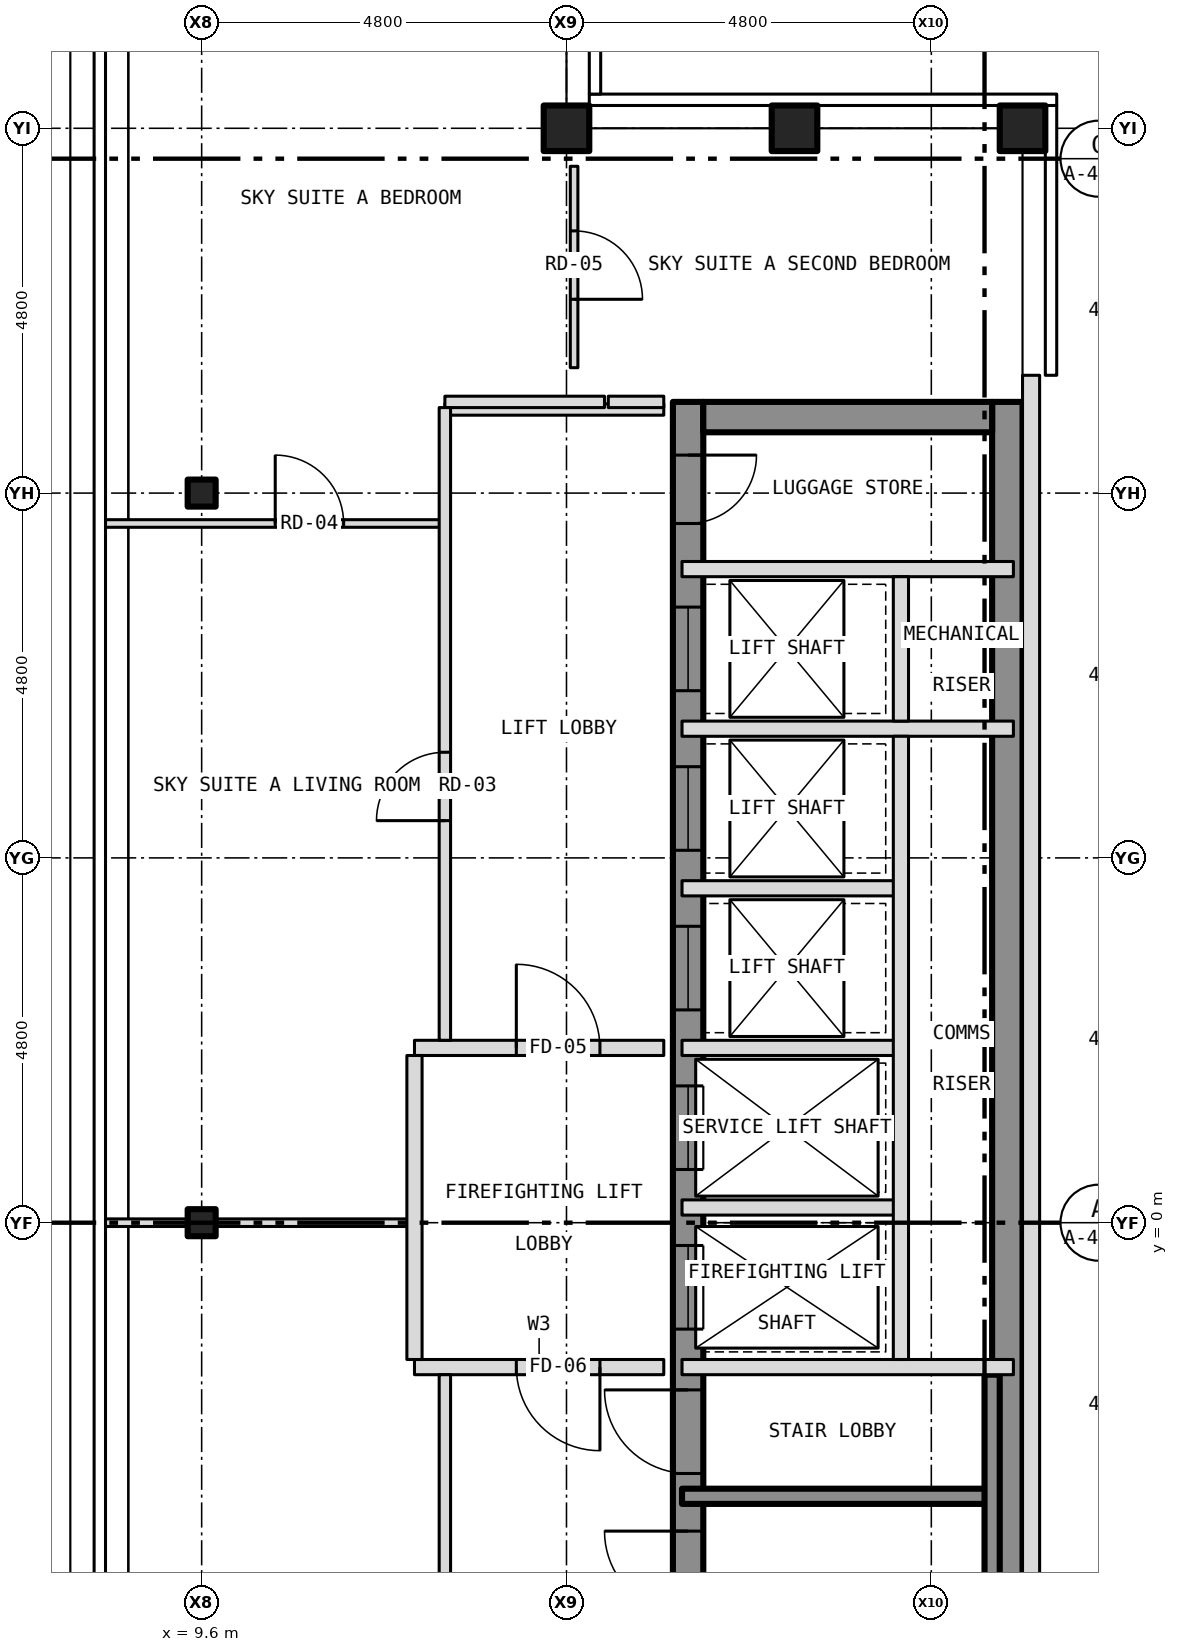
"""IFC4 building model, lengths in metres.
Left out: names, types, materials, properties, quantities, classifications, styles, units other than length and angle.
Written with IfcOpenShell. Run it as: python <this file> out.ifc"""

import sys

from ifc_helpers import new_model, si_unit, direction, frame, frame_2d, origin, origin_2d, place, context, subcontext, project, spatial, rectangle, hollow_rectangle, i_section, extrude, element, fill, save


model = new_model("IFC4")
c1 = context("Model", 3, precision=1e-05, world=origin(), true_north=direction((0.0, 1.0)))
c2 = subcontext(c1, "Body", "Model", "MODEL_VIEW")
j1 = project(units=[si_unit("LENGTHUNIT", "METRE"), si_unit("PLANEANGLEUNIT", "RADIAN")], contexts=[c1])
p1 = place(None, origin())
s1 = spatial("IfcSite", under=j1, at=p1, CompositionType="ELEMENT")
p2 = place(p1, origin())
s2 = spatial("IfcBuilding", under=s1, at=p2, CompositionType="ELEMENT")
p3 = place(p2, frame((0.0, 0.0, 272.5)))
s3 = spatial("IfcBuildingStorey", under=s2, at=p3, CompositionType="ELEMENT", Elevation=272.5)
for number, where, z_axis, x_axis in (
    (1, (20.4, 14.4, -0.15), (0.0, 0.0, 1.0), (1.0, 0.0, 0.0)),
    (2, (14.4, 14.4, -0.15), (0.0, 0.0, 1.0), (1.0, 0.0, 0.0)),
    (3, (17.4, 14.4, -0.15), (0.0, 0.0, 1.0), (1.0, 0.0, 0.0)),
):
    element("IfcColumn", number, at=place(p3, frame(where, z_axis=z_axis, x_axis=x_axis)), inside=s3, PredefinedType="COLUMN", context=c2, shape_type="SweptSolid", body=[
        extrude(hollow_rectangle(XDim=0.6, YDim=0.6, WallThickness=0.03, at=origin_2d()), origin(), (0.0, 0.0, 1.0), 3.5),
    ])
for number, where, z_axis, x_axis in (
    (4, (9.6, 0.0, -0.15), (0.0, 0.0, 1.0), (1.0, 0.0, 0.0)),
    (5, (9.6, 9.6, -0.15), (0.0, 0.0, 1.0), (1.0, 0.0, 0.0)),
):
    element("IfcColumn", number, at=place(p3, frame(where, z_axis=z_axis, x_axis=x_axis)), inside=s3, PredefinedType="COLUMN", context=c2, shape_type="SweptSolid", body=[
        extrude(i_section(OverallWidth=0.368, OverallDepth=0.356, WebThickness=0.011, FlangeThickness=0.018, at=origin_2d()), origin(), (0.0, 0.0, 1.0), 3.5),
    ])
p4 = place(p3, frame((16.0, -10.8, 0.0), z_axis=(0.0, 0.0, 1.0), x_axis=(0.0, 1.0, 0.0)))
e6 = element("IfcWall", 6, at=p4, inside=s3, PredefinedType="SHEAR", context=c2, shape_type="SweptSolid", body=[
    extrude(rectangle(XDim=21.6, YDim=0.4, at=frame_2d((10.8, 0.0))), origin(), (0.0, 0.0, 1.0), 3.25),
])
p5 = place(p4, frame((9.4, 0.0, 0.0)))
e7 = element("IfcOpeningElement", 7, at=p5, cuts=e6, PredefinedType="OPENING", context=c2, shape_type="SweptSolid", body=[
    extrude(rectangle(XDim=1.1, YDim=2.1, at=frame_2d((0.55, 1.05))), frame((0.0, 0.212, 0.0), z_axis=(0.0, -1.0, 0.0), x_axis=(1.0, 0.0, 0.0)), (0.0, 0.0, 1.0), 0.424),
])
p6 = place(p4, frame((11.5, 0.0, 0.0)))
e8 = element("IfcOpeningElement", 8, at=p6, cuts=e6, PredefinedType="OPENING", context=c2, shape_type="SweptSolid", body=[
    extrude(rectangle(XDim=1.1, YDim=2.1, at=frame_2d((0.55, 1.05))), frame((0.0, 0.212, 0.0), z_axis=(0.0, -1.0, 0.0), x_axis=(1.0, 0.0, 0.0)), (0.0, 0.0, 1.0), 0.424),
])
p7 = place(p4, frame((13.6, 0.0, 0.0)))
e9 = element("IfcOpeningElement", 9, at=p7, cuts=e6, PredefinedType="OPENING", context=c2, shape_type="SweptSolid", body=[
    extrude(rectangle(XDim=1.1, YDim=2.1, at=frame_2d((0.55, 1.05))), frame((0.0, 0.212, 0.0), z_axis=(0.0, -1.0, 0.0), x_axis=(1.0, 0.0, 0.0)), (0.0, 0.0, 1.0), 0.424),
])
p8 = place(p4, frame((15.7, 0.0, 0.0)))
e10 = element("IfcOpeningElement", 10, at=p8, cuts=e6, PredefinedType="OPENING", context=c2, shape_type="SweptSolid", body=[
    extrude(rectangle(XDim=1.1, YDim=2.1, at=frame_2d((0.55, 1.05))), frame((0.0, 0.212, 0.0), z_axis=(0.0, -1.0, 0.0), x_axis=(1.0, 0.0, 0.0)), (0.0, 0.0, 1.0), 0.424),
])
p9 = place(p4, frame((17.8, 0.0, 0.0)))
e11 = element("IfcOpeningElement", 11, at=p9, cuts=e6, PredefinedType="OPENING", context=c2, shape_type="SweptSolid", body=[
    extrude(rectangle(XDim=1.1, YDim=2.1, at=frame_2d((0.55, 1.05))), frame((0.0, 0.212, 0.0), z_axis=(0.0, -1.0, 0.0), x_axis=(1.0, 0.0, 0.0)), (0.0, 0.0, 1.0), 0.424),
])
p10 = place(p4, frame((5.642, 0.0, 0.0)))
e12 = element("IfcOpeningElement", 12, at=p10, cuts=e6, PredefinedType="OPENING", context=c2, shape_type="SweptSolid", body=[
    extrude(rectangle(XDim=1.1, YDim=2.1, at=frame_2d((0.55, 1.05))), frame((0.0, 0.212, 0.0), z_axis=(0.0, -1.0, 0.0), x_axis=(1.0, 0.0, 0.0)), (0.0, 0.0, 1.0), 0.424),
])
p11 = place(p4, frame((7.5, 0.0, 0.0)))
e13 = element("IfcOpeningElement", 13, at=p11, cuts=e6, PredefinedType="OPENING", context=c2, shape_type="SweptSolid", body=[
    extrude(rectangle(XDim=1.1, YDim=2.1, at=frame_2d((0.55, 1.05))), frame((0.0, 0.212, 0.0), z_axis=(0.0, -1.0, 0.0), x_axis=(1.0, 0.0, 0.0)), (0.0, 0.0, 1.0), 0.424),
])
p12 = place(p4, frame((20.0, 0.0, 0.0)))
e14 = element("IfcOpeningElement", 14, at=p12, cuts=e6, PredefinedType="OPENING", context=c2, shape_type="SweptSolid", body=[
    extrude(rectangle(XDim=0.9, YDim=2.1, at=frame_2d((0.45, 1.05))), frame((0.0, 0.212, 0.0), z_axis=(0.0, -1.0, 0.0), x_axis=(1.0, 0.0, 0.0)), (0.0, 0.0, 1.0), 0.424),
])
p13 = place(p3, frame((20.2, -10.8, 0.0), z_axis=(0.0, 0.0, 1.0), x_axis=(0.0, 1.0, 0.0)))
e15 = element("IfcWall", 15, at=p13, inside=s3, PredefinedType="SHEAR", context=c2, shape_type="SweptSolid", body=[
    extrude(rectangle(XDim=21.6, YDim=0.4, at=frame_2d((10.8, 0.0))), origin(), (0.0, 0.0, 1.0), 3.25),
])
p14 = place(p3, frame((16.2, 10.6, 0.0), z_axis=(0.0, 0.0, 1.0), x_axis=(1.0, 0.0, 0.0)))
e16 = element("IfcWall", 16, at=p14, inside=s3, PredefinedType="SHEAR", context=c2, shape_type="SweptSolid", body=[
    extrude(rectangle(XDim=3.8, YDim=0.4, at=frame_2d((1.9, 0.0))), origin(), (0.0, 0.0, 1.0), 3.25),
])
p15 = place(p3, frame((20.512, -11.15, 0.0), z_axis=(0.0, 0.0, 1.0), x_axis=(0.0, 1.0, 0.0)))
e17 = element("IfcWall", 17, at=p15, inside=s3, PredefinedType="SOLIDWALL", context=c2, shape_type="SweptSolid", body=[
    extrude(rectangle(XDim=22.3, YDim=0.225, at=frame_2d((11.15, 0.0))), origin(), (0.0, 0.0, 1.0), 3.5),
])
p16 = place(p15, frame((3.3, 0.0, 1.0)))
e18 = element("IfcOpeningElement", 18, at=p16, cuts=e17, PredefinedType="OPENING", context=c2, shape_type="SweptSolid", body=[
    extrude(rectangle(XDim=0.6, YDim=1.5, at=frame_2d((0.3, 0.75))), frame((0.0, 0.125, 0.0), z_axis=(0.0, -1.0, 0.0), x_axis=(1.0, 0.0, 0.0)), (0.0, 0.0, 1.0), 0.249),
])
p17 = place(p3, frame((15.92, -3.6, 0.0), z_axis=(0.0, 0.0, 1.0), x_axis=(1.0, 0.0, 0.0)))
e19 = element("IfcWall", 19, at=p17, inside=s3, PredefinedType="SHEAR", context=c2, shape_type="SweptSolid", body=[
    extrude(rectangle(XDim=4.08, YDim=0.2, at=frame_2d((2.04, 0.0))), origin(), (0.0, 0.0, 1.0), 3.25),
])
p18 = place(p3, frame((12.4, -1.9, 0.0), z_axis=(0.0, 0.0, 1.0), x_axis=(1.0, 0.0, 0.0)))
e20 = element("IfcWall", 20, at=p18, inside=s3, PredefinedType="PARTITIONING", context=c2, shape_type="SweptSolid", body=[
    extrude(rectangle(XDim=3.28, YDim=0.2, at=frame_2d((1.64, 0.0))), origin(), (0.0, 0.0, 1.0), 3.35),
])
p19 = place(p18, frame((1.34, 0.0, 0.0)))
e21 = element("IfcOpeningElement", 21, at=p19, cuts=e20, PredefinedType="OPENING", context=c2, shape_type="SweptSolid", body=[
    extrude(rectangle(XDim=1.1, YDim=2.1, at=frame_2d((0.55, 1.05))), frame((0.0, 0.112, 0.0), z_axis=(0.0, -1.0, 0.0), x_axis=(1.0, 0.0, 0.0)), (0.0, 0.0, 1.0), 0.224),
])
p20 = place(p3, frame((15.92, -1.9, 0.0), z_axis=(0.0, 0.0, 1.0), x_axis=(1.0, 0.0, 0.0)))
e22 = element("IfcWall", 22, at=p20, inside=s3, PredefinedType="PARTITIONING", context=c2, shape_type="SweptSolid", body=[
    extrude(rectangle(XDim=4.36, YDim=0.2, at=frame_2d((2.18, 0.0))), origin(), (0.0, 0.0, 1.0), 3.25),
])
p21 = place(p3, frame((8.305, 0.0, 0.0), z_axis=(0.0, 0.0, 1.0), x_axis=(1.0, 0.0, 0.0)))
e23 = element("IfcWall", 23, at=p21, inside=s3, PredefinedType="PARTITIONING", context=c2, shape_type="SweptSolid", body=[
    extrude(rectangle(XDim=1.479, YDim=0.1, at=frame_2d((0.74, 0.0))), origin(), (0.0, 0.0, 1.0), 3.35),
])
p22 = place(p3, frame((9.784, 0.0, 0.0), z_axis=(0.0, 0.0, 1.0), x_axis=(1.0, 0.0, 0.0)))
e24 = element("IfcWall", 24, at=p22, inside=s3, PredefinedType="PARTITIONING", context=c2, shape_type="SweptSolid", body=[
    extrude(rectangle(XDim=2.616, YDim=0.1, at=frame_2d((1.308, 0.0))), origin(), (0.0, 0.0, 1.0), 2.728),
])
p23 = place(p3, frame((15.92, 0.2, 0.0), z_axis=(0.0, 0.0, 1.0), x_axis=(1.0, 0.0, 0.0)))
e25 = element("IfcWall", 25, at=p23, inside=s3, PredefinedType="PARTITIONING", context=c2, shape_type="SweptSolid", body=[
    extrude(rectangle(XDim=2.88, YDim=0.2, at=frame_2d((1.44, 0.0))), origin(), (0.0, 0.0, 1.0), 3.25),
])
p24 = place(p3, frame((12.4, 2.3, 0.0), z_axis=(0.0, 0.0, 1.0), x_axis=(1.0, 0.0, 0.0)))
e26 = element("IfcWall", 26, at=p24, inside=s3, PredefinedType="PARTITIONING", context=c2, shape_type="SweptSolid", body=[
    extrude(rectangle(XDim=3.28, YDim=0.2, at=frame_2d((1.64, 0.0))), origin(), (0.0, 0.0, 1.0), 3.35),
])
p25 = place(p24, frame((1.34, 0.0, 0.0)))
e27 = element("IfcOpeningElement", 27, at=p25, cuts=e26, PredefinedType="OPENING", context=c2, shape_type="SweptSolid", body=[
    extrude(rectangle(XDim=1.1, YDim=2.1, at=frame_2d((0.55, 1.05))), frame((0.0, 0.112, 0.0), z_axis=(0.0, -1.0, 0.0), x_axis=(1.0, 0.0, 0.0)), (0.0, 0.0, 1.0), 0.224),
])
for number, where, z_axis, x_axis in (
    (28, (15.92, 2.3, 0.0), (0.0, 0.0, 1.0), (1.0, 0.0, 0.0)),
    (29, (15.92, 4.4, 0.0), (0.0, 0.0, 1.0), (1.0, 0.0, 0.0)),
):
    element("IfcWall", number, at=place(p3, frame(where, z_axis=z_axis, x_axis=x_axis)), inside=s3, PredefinedType="PARTITIONING", context=c2, shape_type="SweptSolid", body=[
        extrude(rectangle(XDim=2.88, YDim=0.2, at=frame_2d((1.44, 0.0))), origin(), (0.0, 0.0, 1.0), 3.25),
    ])
for number, where, z_axis, x_axis in (
    (30, (15.92, 6.5, 0.0), (0.0, 0.0, 1.0), (1.0, 0.0, 0.0)),
    (31, (15.92, 8.6, 0.0), (0.0, 0.0, 1.0), (1.0, 0.0, 0.0)),
):
    element("IfcWall", number, at=place(p3, frame(where, z_axis=z_axis, x_axis=x_axis)), inside=s3, PredefinedType="PARTITIONING", context=c2, shape_type="SweptSolid", body=[
        extrude(rectangle(XDim=4.36, YDim=0.2, at=frame_2d((2.18, 0.0))), origin(), (0.0, 0.0, 1.0), 3.25),
    ])
p26 = place(p3, frame((8.305, 9.2, 0.0), z_axis=(0.0, 0.0, 1.0), x_axis=(1.0, 0.0, 0.0)))
e32 = element("IfcWall", 32, at=p26, inside=s3, PredefinedType="PARTITIONING", context=c2, shape_type="SweptSolid", body=[
    extrude(rectangle(XDim=4.495, YDim=0.1, at=frame_2d((2.248, 0.0))), origin(), (0.0, 0.0, 1.0), 3.35),
])
p27 = place(p26, frame((2.263, 0.0, 0.0)))
e33 = element("IfcOpeningElement", 33, at=p27, cuts=e32, PredefinedType="OPENING", context=c2, shape_type="SweptSolid", body=[
    extrude(rectangle(XDim=0.9, YDim=2.1, at=frame_2d((0.45, 1.05))), frame((0.0, 0.062, 0.0), z_axis=(0.0, -1.0, 0.0), x_axis=(1.0, 0.0, 0.0)), (0.0, 0.0, 1.0), 0.124),
])
p28 = place(p3, frame((12.8, 10.7, 0.0), z_axis=(0.0, 0.0, 1.0), x_axis=(1.0, 0.0, 0.0)))
e34 = element("IfcWall", 34, at=p28, inside=s3, PredefinedType="PARTITIONING", context=c2, shape_type="SweptSolid", body=[
    extrude(rectangle(XDim=2.88, YDim=0.15, at=frame_2d((1.44, 0.0))), origin(), (0.0, 0.0, 1.0), 3.35),
])
p29 = place(p3, frame((12.8, 10.8, 0.0), z_axis=(0.0, 0.0, 1.0), x_axis=(1.0, 0.0, 0.0)))
e35 = element("IfcWall", 35, at=p29, inside=s3, PredefinedType="PARTITIONING", context=c2, shape_type="SweptSolid", body=[
    extrude(rectangle(XDim=2.1, YDim=0.15, at=frame_2d((1.05, 0.0))), origin(), (0.0, 0.0, 1.0), 3.35),
])
p30 = place(p3, frame((14.95, 10.8, 0.0), z_axis=(0.0, 0.0, 1.0), x_axis=(1.0, 0.0, 0.0)))
e36 = element("IfcWall", 36, at=p30, inside=s3, PredefinedType="PARTITIONING", context=c2, shape_type="SweptSolid", body=[
    extrude(rectangle(XDim=0.73, YDim=0.15, at=frame_2d((0.365, 0.0))), origin(), (0.0, 0.0, 1.0), 3.35),
])
p31 = place(p3, frame((12.4, -1.8, 0.0), z_axis=(0.0, 0.0, 1.0), x_axis=(0.0, 1.0, 0.0)))
e37 = element("IfcWall", 37, at=p31, inside=s3, PredefinedType="PARTITIONING", context=c2, shape_type="SweptSolid", body=[
    extrude(rectangle(XDim=4.0, YDim=0.2, at=frame_2d((2.0, 0.0))), origin(), (0.0, 0.0, 1.0), 3.35),
])
p32 = place(p3, frame((12.8, -10.725, 0.0), z_axis=(0.0, 0.0, 1.0), x_axis=(0.0, 1.0, 0.0)))
e38 = element("IfcWall", 38, at=p32, inside=s3, PredefinedType="PARTITIONING", context=c2, shape_type="SweptSolid", body=[
    extrude(rectangle(XDim=8.725, YDim=0.15, at=frame_2d((4.363, 0.0))), origin(), (0.0, 0.0, 1.0), 3.35),
])
p33 = place(p32, frame((4.225, 0.0, 0.0)))
e39 = element("IfcOpeningElement", 39, at=p33, cuts=e38, PredefinedType="OPENING", context=c2, shape_type="SweptSolid", body=[
    extrude(rectangle(XDim=0.9, YDim=2.1, at=frame_2d((0.45, 1.05))), frame((0.0, 0.087, 0.0), z_axis=(0.0, -1.0, 0.0), x_axis=(1.0, 0.0, 0.0)), (0.0, 0.0, 1.0), 0.174),
])
p34 = place(p3, frame((12.8, 2.4, 0.0), z_axis=(0.0, 0.0, 1.0), x_axis=(0.0, 1.0, 0.0)))
e40 = element("IfcWall", 40, at=p34, inside=s3, PredefinedType="PARTITIONING", context=c2, shape_type="SweptSolid", body=[
    extrude(rectangle(XDim=8.325, YDim=0.15, at=frame_2d((4.163, 0.0))), origin(), (0.0, 0.0, 1.0), 3.35),
])
p35 = place(p34, frame((2.89, 0.0, 0.0)))
e41 = element("IfcOpeningElement", 41, at=p35, cuts=e40, PredefinedType="OPENING", context=c2, shape_type="SweptSolid", body=[
    extrude(rectangle(XDim=0.9, YDim=2.1, at=frame_2d((0.45, 1.05))), frame((0.0, 0.087, 0.0), z_axis=(0.0, -1.0, 0.0), x_axis=(1.0, 0.0, 0.0)), (0.0, 0.0, 1.0), 0.174),
])
p36 = place(p3, frame((14.5, 11.25, 0.0), z_axis=(0.0, 0.0, 1.0), x_axis=(0.0, 1.0, 0.0)))
e42 = element("IfcWall", 42, at=p36, inside=s3, PredefinedType="PARTITIONING", context=c2, shape_type="SweptSolid", body=[
    extrude(rectangle(XDim=2.65, YDim=0.1, at=frame_2d((1.325, 0.0))), origin(), (0.0, 0.0, 1.0), 2.817),
])
p37 = place(p36, frame((0.9, 0.0, 0.0)))
e43 = element("IfcOpeningElement", 43, at=p37, cuts=e42, PredefinedType="OPENING", context=c2, shape_type="SweptSolid", body=[
    extrude(rectangle(XDim=0.9, YDim=2.1, at=frame_2d((0.45, 1.05))), frame((0.0, 0.062, 0.0), z_axis=(0.0, -1.0, 0.0), x_axis=(1.0, 0.0, 0.0)), (0.0, 0.0, 1.0), 0.124),
])
p38 = place(p3, frame((18.8, -1.8, 0.0), z_axis=(0.0, 0.0, 1.0), x_axis=(0.0, 1.0, 0.0)))
e44 = element("IfcWall", 44, at=p38, inside=s3, PredefinedType="PARTITIONING", context=c2, shape_type="SweptSolid", body=[
    extrude(rectangle(XDim=8.2, YDim=0.2, at=frame_2d((4.1, 0.0))), origin(), (0.0, 0.0, 1.0), 3.25),
])
p39 = place(p3, frame((18.8, 6.6, 0.0), z_axis=(0.0, 0.0, 1.0), x_axis=(0.0, 1.0, 0.0)))
e45 = element("IfcWall", 45, at=p39, inside=s3, PredefinedType="PARTITIONING", context=c2, shape_type="SweptSolid", body=[
    extrude(rectangle(XDim=1.9, YDim=0.2, at=frame_2d((0.95, 0.0))), origin(), (0.0, 0.0, 1.0), 3.25),
])
p40 = place(p3, frame((20.0, -10.68, 0.0), z_axis=(0.0, 0.0, 1.0), x_axis=(0.0, 1.0, 0.0)))
e46 = element("IfcWall", 46, at=p40, inside=s3, PredefinedType="SHEAR", context=c2, shape_type="SweptSolid", body=[
    extrude(rectangle(XDim=8.68, YDim=0.2, at=frame_2d((4.34, 0.0))), origin(), (0.0, 0.0, 1.0), 3.25),
])
p41 = place(p5, origin())
e47 = element("IfcDoor", 47, at=p41, inside=s3, OperationType="SLIDING_TO_LEFT", PredefinedType="DOOR", context=c2, shape_type="SweptSolid", body=[
    extrude(rectangle(XDim=1.1, YDim=2.1, at=frame_2d((0.55, 1.05))), frame((0.0, 0.025, 0.0), z_axis=(0.0, -1.0, 0.0), x_axis=(1.0, 0.0, 0.0)), (0.0, 0.0, 1.0), 0.05),
])
fill(e7, e47)
p42 = place(p6, origin())
e48 = element("IfcDoor", 48, at=p42, inside=s3, OperationType="SLIDING_TO_LEFT", PredefinedType="DOOR", context=c2, shape_type="SweptSolid", body=[
    extrude(rectangle(XDim=1.1, YDim=2.1, at=frame_2d((0.55, 1.05))), frame((0.0, 0.025, 0.0), z_axis=(0.0, -1.0, 0.0), x_axis=(1.0, 0.0, 0.0)), (0.0, 0.0, 1.0), 0.05),
])
fill(e8, e48)
p43 = place(p7, origin())
e49 = element("IfcDoor", 49, at=p43, inside=s3, OperationType="SLIDING_TO_LEFT", PredefinedType="DOOR", context=c2, shape_type="SweptSolid", body=[
    extrude(rectangle(XDim=1.1, YDim=2.1, at=frame_2d((0.55, 1.05))), frame((0.0, 0.025, 0.0), z_axis=(0.0, -1.0, 0.0), x_axis=(1.0, 0.0, 0.0)), (0.0, 0.0, 1.0), 0.05),
])
fill(e9, e49)
p44 = place(p8, origin())
e50 = element("IfcDoor", 50, at=p44, inside=s3, OperationType="SLIDING_TO_LEFT", PredefinedType="DOOR", context=c2, shape_type="SweptSolid", body=[
    extrude(rectangle(XDim=1.1, YDim=2.1, at=frame_2d((0.55, 1.05))), frame((0.0, 0.025, 0.0), z_axis=(0.0, -1.0, 0.0), x_axis=(1.0, 0.0, 0.0)), (0.0, 0.0, 1.0), 0.05),
])
fill(e10, e50)
p45 = place(p9, origin())
e51 = element("IfcDoor", 51, at=p45, inside=s3, OperationType="SLIDING_TO_LEFT", PredefinedType="DOOR", context=c2, shape_type="SweptSolid", body=[
    extrude(rectangle(XDim=1.1, YDim=2.1, at=frame_2d((0.55, 1.05))), frame((0.0, 0.025, 0.0), z_axis=(0.0, -1.0, 0.0), x_axis=(1.0, 0.0, 0.0)), (0.0, 0.0, 1.0), 0.05),
])
fill(e11, e51)
p46 = place(p10, origin())
e52 = element("IfcDoor", 52, at=p46, inside=s3, OperationType="SINGLE_SWING_RIGHT", PredefinedType="DOOR", context=c2, shape_type="SweptSolid", body=[
    extrude(rectangle(XDim=1.1, YDim=2.1, at=frame_2d((0.55, 1.05))), frame((0.0, 0.025, 0.0), z_axis=(0.0, -1.0, 0.0), x_axis=(1.0, 0.0, 0.0)), (0.0, 0.0, 1.0), 0.05),
])
fill(e12, e52)
p47 = place(p11, origin())
e53 = element("IfcDoor", 53, at=p47, inside=s3, OperationType="SINGLE_SWING_RIGHT", PredefinedType="DOOR", context=c2, shape_type="SweptSolid", body=[
    extrude(rectangle(XDim=1.1, YDim=2.1, at=frame_2d((0.55, 1.05))), frame((0.0, 0.025, 0.0), z_axis=(0.0, -1.0, 0.0), x_axis=(1.0, 0.0, 0.0)), (0.0, 0.0, 1.0), 0.05),
])
fill(e13, e53)
p48 = place(p12, origin())
e54 = element("IfcDoor", 54, at=p48, inside=s3, OperationType="SINGLE_SWING_RIGHT", PredefinedType="DOOR", context=c2, shape_type="SweptSolid", body=[
    extrude(rectangle(XDim=0.9, YDim=2.1, at=frame_2d((0.45, 1.05))), frame((0.0, 0.025, 0.0), z_axis=(0.0, -1.0, 0.0), x_axis=(1.0, 0.0, 0.0)), (0.0, 0.0, 1.0), 0.05),
])
fill(e14, e54)
p49 = place(p25, origin())
e55 = element("IfcDoor", 55, at=p49, inside=s3, OperationType="SINGLE_SWING_LEFT", PredefinedType="DOOR", context=c2, shape_type="SweptSolid", body=[
    extrude(rectangle(XDim=1.1, YDim=2.1, at=frame_2d((0.55, 1.05))), frame((0.0, 0.025, 0.0), z_axis=(0.0, -1.0, 0.0), x_axis=(1.0, 0.0, 0.0)), (0.0, 0.0, 1.0), 0.05),
])
fill(e27, e55)
p50 = place(p19, origin())
e56 = element("IfcDoor", 56, at=p50, inside=s3, OperationType="SINGLE_SWING_RIGHT", PredefinedType="DOOR", context=c2, shape_type="SweptSolid", body=[
    extrude(rectangle(XDim=1.1, YDim=2.1, at=frame_2d((0.55, 1.05))), frame((0.0, 0.025, 0.0), z_axis=(0.0, -1.0, 0.0), x_axis=(1.0, 0.0, 0.0)), (0.0, 0.0, 1.0), 0.05),
])
fill(e21, e56)
p51 = place(p35, origin())
e57 = element("IfcDoor", 57, at=p51, inside=s3, OperationType="SINGLE_SWING_LEFT", PredefinedType="DOOR", context=c2, shape_type="SweptSolid", body=[
    extrude(rectangle(XDim=0.9, YDim=2.1, at=frame_2d((0.45, 1.05))), frame((0.0, 0.025, 0.0), z_axis=(0.0, -1.0, 0.0), x_axis=(1.0, 0.0, 0.0)), (0.0, 0.0, 1.0), 0.05),
])
fill(e41, e57)
p52 = place(p27, origin())
e58 = element("IfcDoor", 58, at=p52, inside=s3, OperationType="SINGLE_SWING_LEFT", PredefinedType="DOOR", context=c2, shape_type="SweptSolid", body=[
    extrude(rectangle(XDim=0.9, YDim=2.1, at=frame_2d((0.45, 1.05))), frame((0.0, 0.025, 0.0), z_axis=(0.0, -1.0, 0.0), x_axis=(1.0, 0.0, 0.0)), (0.0, 0.0, 1.0), 0.05),
])
fill(e33, e58)
p53 = place(p37, origin())
e59 = element("IfcDoor", 59, at=p53, inside=s3, OperationType="SINGLE_SWING_LEFT", PredefinedType="DOOR", context=c2, shape_type="SweptSolid", body=[
    extrude(rectangle(XDim=0.9, YDim=2.1, at=frame_2d((0.45, 1.05))), frame((0.0, 0.025, 0.0), z_axis=(0.0, -1.0, 0.0), x_axis=(1.0, 0.0, 0.0)), (0.0, 0.0, 1.0), 0.05),
])
fill(e43, e59)
save(model, sys.argv[1])
